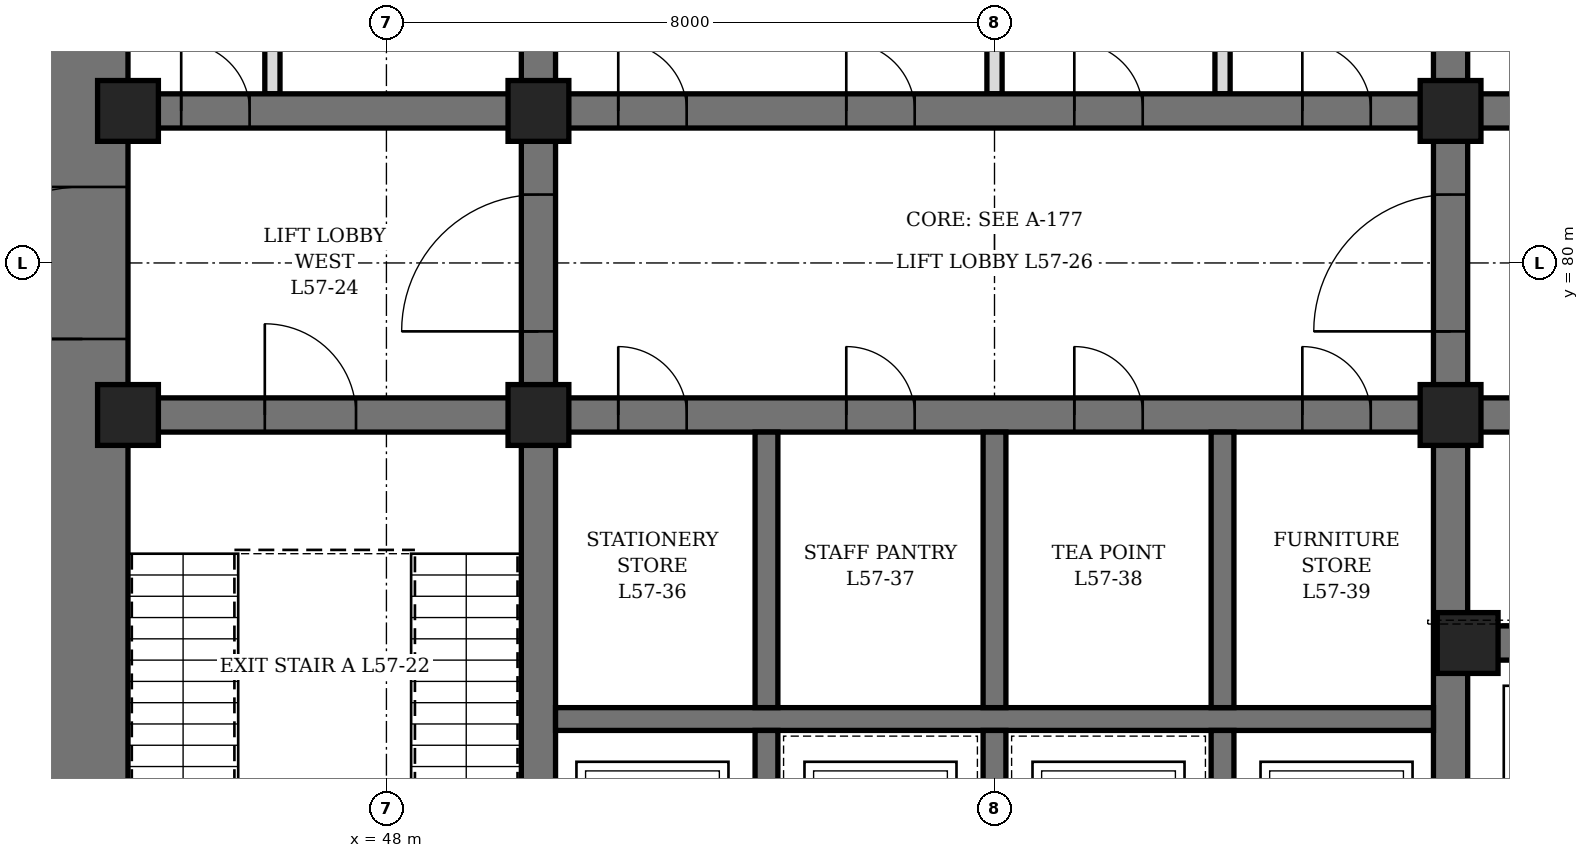
"""IFC4 building model, lengths in metres.
Left out: names, types, materials, properties, quantities, classifications, styles, units other than length and angle.
Written with IfcOpenShell. Run it as: python <this file> out.ifc"""

import sys

from ifc_helpers import new_model, si_unit, direction, frame, frame_2d, origin, origin_2d, place, context, subcontext, project, spatial, rectangle, hollow_rectangle, extrude, element, fill, save


model = new_model("IFC4")
c1 = context("Model", 3, precision=1e-05, world=origin(), true_north=direction((0.0, 1.0)))
c2 = subcontext(c1, "Body", "Model", "MODEL_VIEW")
j1 = project(units=[si_unit("LENGTHUNIT", "METRE"), si_unit("PLANEANGLEUNIT", "RADIAN")], contexts=[c1])
p1 = place(None, origin())
s1 = spatial("IfcSite", under=j1, at=p1, CompositionType="ELEMENT")
p2 = place(p1, origin())
s2 = spatial("IfcBuilding", under=s1, at=p2, CompositionType="ELEMENT")
p3 = place(p2, frame((0.0, 0.0, 254.5)))
s3 = spatial("IfcBuildingStorey", under=s2, at=p3, CompositionType="ELEMENT", Elevation=254.5)
p4 = place(p3, frame((44.0, 70.4, 0.0), z_axis=(0.0, 0.0, 1.0), x_axis=(0.0, 1.0, 0.0)))
e1 = element("IfcWall", 1, at=p4, inside=s3, PredefinedType="SHEAR", context=c2, shape_type="SweptSolid", body=[
    extrude(rectangle(XDim=19.2, YDim=1.2, at=frame_2d((9.6, 0.0))), origin(), (0.0, 0.0, 1.0), 4.2),
])
p5 = place(p4, frame((8.6, 0.0, 0.0)))
e2 = element("IfcOpeningElement", 2, at=p5, cuts=e1, PredefinedType="OPENING", context=c2, shape_type="SweptSolid", body=[
    extrude(rectangle(XDim=2.0, YDim=2.4, at=frame_2d((1.0, 1.2))), frame((0.0, 0.61, 0.0), z_axis=(0.0, -1.0, 0.0), x_axis=(1.0, 0.0, 0.0)), (0.0, 0.0, 1.0), 1.22),
])
p6 = place(p3, frame((50.0, 71.6, 0.0), z_axis=(0.0, 0.0, 1.0), x_axis=(0.0, 1.0, 0.0)))
e3 = element("IfcWall", 3, at=p6, inside=s3, PredefinedType="SHEAR", context=c2, shape_type="SweptSolid", body=[
    extrude(rectangle(XDim=16.8, YDim=0.45, at=frame_2d((8.4, 0.0))), origin(), (0.0, 0.0, 1.0), 4.2),
])
p7 = place(p6, frame((7.5, 0.0, 0.0)))
e4 = element("IfcOpeningElement", 4, at=p7, cuts=e3, PredefinedType="OPENING", context=c2, shape_type="SweptSolid", body=[
    extrude(rectangle(XDim=1.8, YDim=2.4, at=frame_2d((0.9, 1.2))), frame((0.0, 0.235, 0.0), z_axis=(0.0, -1.0, 0.0), x_axis=(1.0, 0.0, 0.0)), (0.0, 0.0, 1.0), 0.47),
])
p8 = place(p3, frame((62.0, 71.6, 0.0), z_axis=(0.0, 0.0, 1.0), x_axis=(0.0, 1.0, 0.0)))
e5 = element("IfcWall", 5, at=p8, inside=s3, PredefinedType="SHEAR", context=c2, shape_type="SweptSolid", body=[
    extrude(rectangle(XDim=16.8, YDim=0.45, at=frame_2d((8.4, 0.0))), origin(), (0.0, 0.0, 1.0), 4.2),
])
p9 = place(p8, frame((7.5, 0.0, 0.0)))
e6 = element("IfcOpeningElement", 6, at=p9, cuts=e5, PredefinedType="OPENING", context=c2, shape_type="SweptSolid", body=[
    extrude(rectangle(XDim=1.8, YDim=2.4, at=frame_2d((0.9, 1.2))), frame((0.0, 0.235, 0.0), z_axis=(0.0, -1.0, 0.0), x_axis=(1.0, 0.0, 0.0)), (0.0, 0.0, 1.0), 0.47),
])
p10 = place(p3, frame((44.6, 78.0, 0.0), z_axis=(0.0, 0.0, 1.0), x_axis=(1.0, 0.0, 0.0)))
e7 = element("IfcWall", 7, at=p10, inside=s3, PredefinedType="SHEAR", context=c2, shape_type="SweptSolid", body=[
    extrude(rectangle(XDim=5.175, YDim=0.45, at=frame_2d((2.587, 0.0))), origin(), (0.0, 0.0, 1.0), 4.2),
])
p11 = place(p10, frame((1.8, 0.0, 0.0)))
e8 = element("IfcOpeningElement", 8, at=p11, cuts=e7, PredefinedType="OPENING", context=c2, shape_type="SweptSolid", body=[
    extrude(rectangle(XDim=1.2, YDim=2.1, at=frame_2d((0.6, 1.05))), frame((0.0, 0.235, 0.0), z_axis=(0.0, -1.0, 0.0), x_axis=(1.0, 0.0, 0.0)), (0.0, 0.0, 1.0), 0.47),
])
p12 = place(p3, frame((44.6, 82.0, 0.0), z_axis=(0.0, 0.0, 1.0), x_axis=(1.0, 0.0, 0.0)))
e9 = element("IfcWall", 9, at=p12, inside=s3, PredefinedType="SHEAR", context=c2, shape_type="SweptSolid", body=[
    extrude(rectangle(XDim=5.175, YDim=0.45, at=frame_2d((2.587, 0.0))), origin(), (0.0, 0.0, 1.0), 4.2),
])
p13 = place(p12, frame((0.7, 0.0, 0.0)))
e10 = element("IfcOpeningElement", 10, at=p13, cuts=e9, PredefinedType="OPENING", context=c2, shape_type="SweptSolid", body=[
    extrude(rectangle(XDim=0.9, YDim=2.1, at=frame_2d((0.45, 1.05))), frame((0.0, 0.235, 0.0), z_axis=(0.0, -1.0, 0.0), x_axis=(1.0, 0.0, 0.0)), (0.0, 0.0, 1.0), 0.47),
])
p14 = place(p3, frame((62.225, 75.0, 0.0), z_axis=(0.0, 0.0, 1.0), x_axis=(1.0, 0.0, 0.0)))
e11 = element("IfcWall", 11, at=p14, inside=s3, PredefinedType="SHEAR", context=c2, shape_type="SweptSolid", body=[
    extrude(rectangle(XDim=5.175, YDim=0.45, at=frame_2d((2.587, 0.0))), origin(), (0.0, 0.0, 1.0), 4.2),
])
p15 = place(p14, frame((0.675, 0.0, 0.0)))
e12 = element("IfcOpeningElement", 12, at=p15, cuts=e11, PredefinedType="OPENING", context=c2, shape_type="SweptSolid", body=[
    extrude(rectangle(XDim=1.2, YDim=2.2, at=frame_2d((0.6, 1.1))), frame((0.0, 0.235, 0.0), z_axis=(0.0, -1.0, 0.0), x_axis=(1.0, 0.0, 0.0)), (0.0, 0.0, 1.0), 0.47),
])
p16 = place(p14, frame((3.425, 0.0, 0.0)))
e13 = element("IfcOpeningElement", 13, at=p16, cuts=e11, PredefinedType="OPENING", context=c2, shape_type="SweptSolid", body=[
    extrude(rectangle(XDim=1.2, YDim=2.2, at=frame_2d((0.6, 1.1))), frame((0.0, 0.235, 0.0), z_axis=(0.0, -1.0, 0.0), x_axis=(1.0, 0.0, 0.0)), (0.0, 0.0, 1.0), 0.47),
])
p17 = place(p3, frame((62.225, 78.0, 0.0), z_axis=(0.0, 0.0, 1.0), x_axis=(1.0, 0.0, 0.0)))
e14 = element("IfcWall", 14, at=p17, inside=s3, PredefinedType="SHEAR", context=c2, shape_type="SweptSolid", body=[
    extrude(rectangle(XDim=5.175, YDim=0.45, at=frame_2d((2.587, 0.0))), origin(), (0.0, 0.0, 1.0), 4.2),
])
p18 = place(p17, frame((2.175, 0.0, 0.0)))
e15 = element("IfcOpeningElement", 15, at=p18, cuts=e14, PredefinedType="OPENING", context=c2, shape_type="SweptSolid", body=[
    extrude(rectangle(XDim=1.2, YDim=2.1, at=frame_2d((0.6, 1.05))), frame((0.0, 0.235, 0.0), z_axis=(0.0, -1.0, 0.0), x_axis=(1.0, 0.0, 0.0)), (0.0, 0.0, 1.0), 0.47),
])
p19 = place(p3, frame((62.225, 82.0, 0.0), z_axis=(0.0, 0.0, 1.0), x_axis=(1.0, 0.0, 0.0)))
e16 = element("IfcWall", 16, at=p19, inside=s3, PredefinedType="SHEAR", context=c2, shape_type="SweptSolid", body=[
    extrude(rectangle(XDim=5.175, YDim=0.45, at=frame_2d((2.587, 0.0))), origin(), (0.0, 0.0, 1.0), 4.2),
])
p20 = place(p19, frame((2.175, 0.0, 0.0)))
e17 = element("IfcOpeningElement", 17, at=p20, cuts=e16, PredefinedType="OPENING", context=c2, shape_type="SweptSolid", body=[
    extrude(rectangle(XDim=1.2, YDim=2.1, at=frame_2d((0.6, 1.05))), frame((0.0, 0.235, 0.0), z_axis=(0.0, -1.0, 0.0), x_axis=(1.0, 0.0, 0.0)), (0.0, 0.0, 1.0), 0.47),
])
p21 = place(p3, frame((50.225, 78.0, 0.0), z_axis=(0.0, 0.0, 1.0), x_axis=(1.0, 0.0, 0.0)))
e18 = element("IfcWall", 18, at=p21, inside=s3, PredefinedType="SHEAR", context=c2, shape_type="SweptSolid", body=[
    extrude(rectangle(XDim=11.55, YDim=0.45, at=frame_2d((5.775, 0.0))), origin(), (0.0, 0.0, 1.0), 4.2),
])
p22 = place(p21, frame((0.825, 0.0, 0.0)))
e19 = element("IfcOpeningElement", 19, at=p22, cuts=e18, PredefinedType="OPENING", context=c2, shape_type="SweptSolid", body=[
    extrude(rectangle(XDim=0.9, YDim=2.1, at=frame_2d((0.45, 1.05))), frame((0.0, 0.235, 0.0), z_axis=(0.0, -1.0, 0.0), x_axis=(1.0, 0.0, 0.0)), (0.0, 0.0, 1.0), 0.47),
])
p23 = place(p21, frame((3.825, 0.0, 0.0)))
e20 = element("IfcOpeningElement", 20, at=p23, cuts=e18, PredefinedType="OPENING", context=c2, shape_type="SweptSolid", body=[
    extrude(rectangle(XDim=0.9, YDim=2.1, at=frame_2d((0.45, 1.05))), frame((0.0, 0.235, 0.0), z_axis=(0.0, -1.0, 0.0), x_axis=(1.0, 0.0, 0.0)), (0.0, 0.0, 1.0), 0.47),
])
p24 = place(p21, frame((6.825, 0.0, 0.0)))
e21 = element("IfcOpeningElement", 21, at=p24, cuts=e18, PredefinedType="OPENING", context=c2, shape_type="SweptSolid", body=[
    extrude(rectangle(XDim=0.9, YDim=2.1, at=frame_2d((0.45, 1.05))), frame((0.0, 0.235, 0.0), z_axis=(0.0, -1.0, 0.0), x_axis=(1.0, 0.0, 0.0)), (0.0, 0.0, 1.0), 0.47),
])
p25 = place(p21, frame((9.825, 0.0, 0.0)))
e22 = element("IfcOpeningElement", 22, at=p25, cuts=e18, PredefinedType="OPENING", context=c2, shape_type="SweptSolid", body=[
    extrude(rectangle(XDim=0.9, YDim=2.1, at=frame_2d((0.45, 1.05))), frame((0.0, 0.235, 0.0), z_axis=(0.0, -1.0, 0.0), x_axis=(1.0, 0.0, 0.0)), (0.0, 0.0, 1.0), 0.47),
])
p26 = place(p3, frame((50.225, 82.0, 0.0), z_axis=(0.0, 0.0, 1.0), x_axis=(1.0, 0.0, 0.0)))
e23 = element("IfcWall", 23, at=p26, inside=s3, PredefinedType="SHEAR", context=c2, shape_type="SweptSolid", body=[
    extrude(rectangle(XDim=11.55, YDim=0.45, at=frame_2d((5.775, 0.0))), origin(), (0.0, 0.0, 1.0), 4.2),
])
p27 = place(p26, frame((0.825, 0.0, 0.0)))
e24 = element("IfcOpeningElement", 24, at=p27, cuts=e23, PredefinedType="OPENING", context=c2, shape_type="SweptSolid", body=[
    extrude(rectangle(XDim=0.9, YDim=2.1, at=frame_2d((0.45, 1.05))), frame((0.0, 0.235, 0.0), z_axis=(0.0, -1.0, 0.0), x_axis=(1.0, 0.0, 0.0)), (0.0, 0.0, 1.0), 0.47),
])
p28 = place(p26, frame((3.825, 0.0, 0.0)))
e25 = element("IfcOpeningElement", 25, at=p28, cuts=e23, PredefinedType="OPENING", context=c2, shape_type="SweptSolid", body=[
    extrude(rectangle(XDim=0.9, YDim=2.1, at=frame_2d((0.45, 1.05))), frame((0.0, 0.235, 0.0), z_axis=(0.0, -1.0, 0.0), x_axis=(1.0, 0.0, 0.0)), (0.0, 0.0, 1.0), 0.47),
])
p29 = place(p26, frame((6.825, 0.0, 0.0)))
e26 = element("IfcOpeningElement", 26, at=p29, cuts=e23, PredefinedType="OPENING", context=c2, shape_type="SweptSolid", body=[
    extrude(rectangle(XDim=0.9, YDim=2.1, at=frame_2d((0.45, 1.05))), frame((0.0, 0.235, 0.0), z_axis=(0.0, -1.0, 0.0), x_axis=(1.0, 0.0, 0.0)), (0.0, 0.0, 1.0), 0.47),
])
p30 = place(p26, frame((9.825, 0.0, 0.0)))
e27 = element("IfcOpeningElement", 27, at=p30, cuts=e23, PredefinedType="OPENING", context=c2, shape_type="SweptSolid", body=[
    extrude(rectangle(XDim=0.9, YDim=2.1, at=frame_2d((0.45, 1.05))), frame((0.0, 0.235, 0.0), z_axis=(0.0, -1.0, 0.0), x_axis=(1.0, 0.0, 0.0)), (0.0, 0.0, 1.0), 0.47),
])
p31 = place(p3, frame((50.225, 74.0, 0.0), z_axis=(0.0, 0.0, 1.0), x_axis=(1.0, 0.0, 0.0)))
e28 = element("IfcWall", 28, at=p31, inside=s3, PredefinedType="SHEAR", context=c2, shape_type="SweptSolid", body=[
    extrude(rectangle(XDim=11.55, YDim=0.3, at=frame_2d((5.775, 0.0))), origin(), (0.0, 0.0, 1.0), 4.2),
])
p32 = place(p3, frame((53.0, 71.6, 0.0), z_axis=(0.0, 0.0, 1.0), x_axis=(0.0, 1.0, 0.0)))
e29 = element("IfcWall", 29, at=p32, inside=s3, PredefinedType="SHEAR", context=c2, shape_type="SweptSolid", body=[
    extrude(rectangle(XDim=2.25, YDim=0.3, at=frame_2d((1.125, 0.0))), origin(), (0.0, 0.0, 1.0), 4.2),
])
p33 = place(p3, frame((53.0, 74.15, 0.0), z_axis=(0.0, 0.0, 1.0), x_axis=(0.0, 1.0, 0.0)))
e30 = element("IfcWall", 30, at=p33, inside=s3, PredefinedType="SHEAR", context=c2, shape_type="SweptSolid", body=[
    extrude(rectangle(XDim=3.625, YDim=0.3, at=frame_2d((1.812, 0.0))), origin(), (0.0, 0.0, 1.0), 4.2),
])
p34 = place(p3, frame((56.0, 71.6, 0.0), z_axis=(0.0, 0.0, 1.0), x_axis=(0.0, 1.0, 0.0)))
e31 = element("IfcWall", 31, at=p34, inside=s3, PredefinedType="SHEAR", context=c2, shape_type="SweptSolid", body=[
    extrude(rectangle(XDim=2.25, YDim=0.3, at=frame_2d((1.125, 0.0))), origin(), (0.0, 0.0, 1.0), 4.2),
])
p35 = place(p3, frame((56.0, 74.15, 0.0), z_axis=(0.0, 0.0, 1.0), x_axis=(0.0, 1.0, 0.0)))
e32 = element("IfcWall", 32, at=p35, inside=s3, PredefinedType="SHEAR", context=c2, shape_type="SweptSolid", body=[
    extrude(rectangle(XDim=3.625, YDim=0.3, at=frame_2d((1.812, 0.0))), origin(), (0.0, 0.0, 1.0), 4.2),
])
p36 = place(p3, frame((59.0, 71.6, 0.0), z_axis=(0.0, 0.0, 1.0), x_axis=(0.0, 1.0, 0.0)))
e33 = element("IfcWall", 33, at=p36, inside=s3, PredefinedType="SHEAR", context=c2, shape_type="SweptSolid", body=[
    extrude(rectangle(XDim=2.25, YDim=0.3, at=frame_2d((1.125, 0.0))), origin(), (0.0, 0.0, 1.0), 4.2),
])
p37 = place(p3, frame((59.0, 74.15, 0.0), z_axis=(0.0, 0.0, 1.0), x_axis=(0.0, 1.0, 0.0)))
e34 = element("IfcWall", 34, at=p37, inside=s3, PredefinedType="SHEAR", context=c2, shape_type="SweptSolid", body=[
    extrude(rectangle(XDim=3.625, YDim=0.3, at=frame_2d((1.812, 0.0))), origin(), (0.0, 0.0, 1.0), 4.2),
])
for number, where, z_axis, x_axis in (
    (35, (44.6, 78.0, 0.0), (0.0, 0.0, 1.0), (1.0, 0.0, 0.0)),
    (36, (44.6, 82.0, 0.0), (0.0, 0.0, 1.0), (1.0, 0.0, 0.0)),
    (37, (50.0, 78.0, 0.0), (0.0, 0.0, 1.0), (1.0, 0.0, 0.0)),
    (38, (50.0, 82.0, 0.0), (0.0, 0.0, 1.0), (1.0, 0.0, 0.0)),
    (39, (62.0, 78.0, 0.0), (0.0, 0.0, 1.0), (1.0, 0.0, 0.0)),
    (40, (62.0, 82.0, 0.0), (0.0, 0.0, 1.0), (1.0, 0.0, 0.0)),
    (41, (62.225, 75.0, 0.0), (0.0, 0.0, 1.0), (1.0, 0.0, 0.0)),
):
    element("IfcColumn", number, at=place(p3, frame(where, z_axis=z_axis, x_axis=x_axis)), inside=s3, PredefinedType="COLUMN", context=c2, shape_type="SweptSolid", body=[
        extrude(hollow_rectangle(XDim=0.8, YDim=0.8, WallThickness=0.1, at=origin_2d()), origin(), (0.0, 0.0, 1.0), 4.2),
    ])
p38 = place(p3, frame((46.5, 82.225, 0.0), z_axis=(0.0, 0.0, 1.0), x_axis=(0.0, 1.0, 0.0)))
e42 = element("IfcWall", 42, at=p38, inside=s3, PredefinedType="PARTITIONING", context=c2, shape_type="SweptSolid", body=[
    extrude(rectangle(XDim=3.05, YDim=0.2, at=frame_2d((1.525, 0.0))), origin(), (0.0, 0.0, 1.0), 4.04),
])
p39 = place(p38, frame((1.075, 0.0, 0.0)))
e43 = element("IfcOpeningElement", 43, at=p39, cuts=e42, PredefinedType="OPENING", context=c2, shape_type="SweptSolid", body=[
    extrude(rectangle(XDim=0.9, YDim=2.1, at=frame_2d((0.45, 1.05))), frame((0.0, 0.11, 0.0), z_axis=(0.0, -1.0, 0.0), x_axis=(1.0, 0.0, 0.0)), (0.0, 0.0, 1.0), 0.22),
])
p40 = place(p3, frame((56.0, 82.225, 0.0), z_axis=(0.0, 0.0, 1.0), x_axis=(0.0, 1.0, 0.0)))
e44 = element("IfcWall", 44, at=p40, inside=s3, PredefinedType="PARTITIONING", context=c2, shape_type="SweptSolid", body=[
    extrude(rectangle(XDim=3.55, YDim=0.2, at=frame_2d((1.775, 0.0))), origin(), (0.0, 0.0, 1.0), 3.14),
])
p41 = place(p3, frame((59.0, 82.225, 0.0), z_axis=(0.0, 0.0, 1.0), x_axis=(0.0, 1.0, 0.0)))
e45 = element("IfcWall", 45, at=p41, inside=s3, PredefinedType="PARTITIONING", context=c2, shape_type="SweptSolid", body=[
    extrude(rectangle(XDim=3.55, YDim=0.2, at=frame_2d((1.775, 0.0))), origin(), (0.0, 0.0, 1.0), 4.04),
])
p42 = place(p13, origin())
e46 = element("IfcDoor", 46, at=p42, inside=s3, OperationType="SINGLE_SWING_LEFT", PredefinedType="DOOR", context=c2, shape_type="SweptSolid", body=[
    extrude(rectangle(XDim=0.9, YDim=2.1, at=frame_2d((0.45, 1.05))), frame((0.0, 0.225, 0.0), z_axis=(0.0, -1.0, 0.0), x_axis=(1.0, 0.0, 0.0)), (0.0, 0.0, 1.0), 0.449),
])
fill(e10, e46)
p43 = place(p22, origin())
e47 = element("IfcDoor", 47, at=p43, inside=s3, OperationType="SINGLE_SWING_LEFT", PredefinedType="DOOR", context=c2, shape_type="SweptSolid", body=[
    extrude(rectangle(XDim=0.9, YDim=2.1, at=frame_2d((0.45, 1.05))), frame((0.0, 0.225, 0.0), z_axis=(0.0, -1.0, 0.0), x_axis=(1.0, 0.0, 0.0)), (0.0, 0.0, 1.0), 0.449),
])
fill(e19, e47)
p44 = place(p23, origin())
e48 = element("IfcDoor", 48, at=p44, inside=s3, OperationType="SINGLE_SWING_LEFT", PredefinedType="DOOR", context=c2, shape_type="SweptSolid", body=[
    extrude(rectangle(XDim=0.9, YDim=2.1, at=frame_2d((0.45, 1.05))), frame((0.0, 0.225, 0.0), z_axis=(0.0, -1.0, 0.0), x_axis=(1.0, 0.0, 0.0)), (0.0, 0.0, 1.0), 0.449),
])
fill(e20, e48)
p45 = place(p24, origin())
e49 = element("IfcDoor", 49, at=p45, inside=s3, OperationType="SINGLE_SWING_LEFT", PredefinedType="DOOR", context=c2, shape_type="SweptSolid", body=[
    extrude(rectangle(XDim=0.9, YDim=2.1, at=frame_2d((0.45, 1.05))), frame((0.0, 0.225, 0.0), z_axis=(0.0, -1.0, 0.0), x_axis=(1.0, 0.0, 0.0)), (0.0, 0.0, 1.0), 0.449),
])
fill(e21, e49)
p46 = place(p25, origin())
e50 = element("IfcDoor", 50, at=p46, inside=s3, OperationType="SINGLE_SWING_LEFT", PredefinedType="DOOR", context=c2, shape_type="SweptSolid", body=[
    extrude(rectangle(XDim=0.9, YDim=2.1, at=frame_2d((0.45, 1.05))), frame((0.0, 0.225, 0.0), z_axis=(0.0, -1.0, 0.0), x_axis=(1.0, 0.0, 0.0)), (0.0, 0.0, 1.0), 0.449),
])
fill(e22, e50)
p47 = place(p27, origin())
e51 = element("IfcDoor", 51, at=p47, inside=s3, OperationType="SINGLE_SWING_LEFT", PredefinedType="DOOR", context=c2, shape_type="SweptSolid", body=[
    extrude(rectangle(XDim=0.9, YDim=2.1, at=frame_2d((0.45, 1.05))), frame((0.0, 0.225, 0.0), z_axis=(0.0, -1.0, 0.0), x_axis=(1.0, 0.0, 0.0)), (0.0, 0.0, 1.0), 0.449),
])
fill(e24, e51)
p48 = place(p28, origin())
e52 = element("IfcDoor", 52, at=p48, inside=s3, OperationType="SINGLE_SWING_LEFT", PredefinedType="DOOR", context=c2, shape_type="SweptSolid", body=[
    extrude(rectangle(XDim=0.9, YDim=2.1, at=frame_2d((0.45, 1.05))), frame((0.0, 0.225, 0.0), z_axis=(0.0, -1.0, 0.0), x_axis=(1.0, 0.0, 0.0)), (0.0, 0.0, 1.0), 0.449),
])
fill(e25, e52)
p49 = place(p29, origin())
e53 = element("IfcDoor", 53, at=p49, inside=s3, OperationType="SINGLE_SWING_LEFT", PredefinedType="DOOR", context=c2, shape_type="SweptSolid", body=[
    extrude(rectangle(XDim=0.9, YDim=2.1, at=frame_2d((0.45, 1.05))), frame((0.0, 0.225, 0.0), z_axis=(0.0, -1.0, 0.0), x_axis=(1.0, 0.0, 0.0)), (0.0, 0.0, 1.0), 0.449),
])
fill(e26, e53)
p50 = place(p30, origin())
e54 = element("IfcDoor", 54, at=p50, inside=s3, OperationType="SINGLE_SWING_LEFT", PredefinedType="DOOR", context=c2, shape_type="SweptSolid", body=[
    extrude(rectangle(XDim=0.9, YDim=2.1, at=frame_2d((0.45, 1.05))), frame((0.0, 0.225, 0.0), z_axis=(0.0, -1.0, 0.0), x_axis=(1.0, 0.0, 0.0)), (0.0, 0.0, 1.0), 0.449),
])
fill(e27, e54)
p51 = place(p11, origin())
e55 = element("IfcDoor", 55, at=p51, inside=s3, OperationType="SINGLE_SWING_LEFT", PredefinedType="DOOR", context=c2, shape_type="SweptSolid", body=[
    extrude(rectangle(XDim=1.2, YDim=2.1, at=frame_2d((0.6, 1.05))), frame((0.0, 0.225, 0.0), z_axis=(0.0, -1.0, 0.0), x_axis=(1.0, 0.0, 0.0)), (0.0, 0.0, 1.0), 0.449),
])
fill(e8, e55)
p52 = place(p5, origin())
e56 = element("IfcDoor", 56, at=p52, inside=s3, OperationType="DOUBLE_DOOR_SINGLE_SWING", PredefinedType="DOOR", context=c2, shape_type="SweptSolid", body=[
    extrude(rectangle(XDim=2.0, YDim=2.4, at=frame_2d((1.0, 1.2))), frame((0.0, 0.35, 0.0), z_axis=(0.0, -1.0, 0.0), x_axis=(1.0, 0.0, 0.0)), (0.0, 0.0, 1.0), 0.7),
])
fill(e2, e56)
p53 = place(p7, origin())
e57 = element("IfcDoor", 57, at=p53, inside=s3, OperationType="DOUBLE_DOOR_SINGLE_SWING", PredefinedType="DOOR", context=c2, shape_type="SweptSolid", body=[
    extrude(rectangle(XDim=1.8, YDim=2.4, at=frame_2d((0.9, 1.2))), frame((0.0, 0.225, 0.0), z_axis=(0.0, -1.0, 0.0), x_axis=(1.0, 0.0, 0.0)), (0.0, 0.0, 1.0), 0.449),
])
fill(e4, e57)
p54 = place(p9, origin())
e58 = element("IfcDoor", 58, at=p54, inside=s3, OperationType="DOUBLE_DOOR_SINGLE_SWING", PredefinedType="DOOR", context=c2, shape_type="SweptSolid", body=[
    extrude(rectangle(XDim=1.8, YDim=2.4, at=frame_2d((0.9, 1.2))), frame((0.0, 0.225, 0.0), z_axis=(0.0, -1.0, 0.0), x_axis=(1.0, 0.0, 0.0)), (0.0, 0.0, 1.0), 0.449),
])
fill(e6, e58)
save(model, sys.argv[1])
